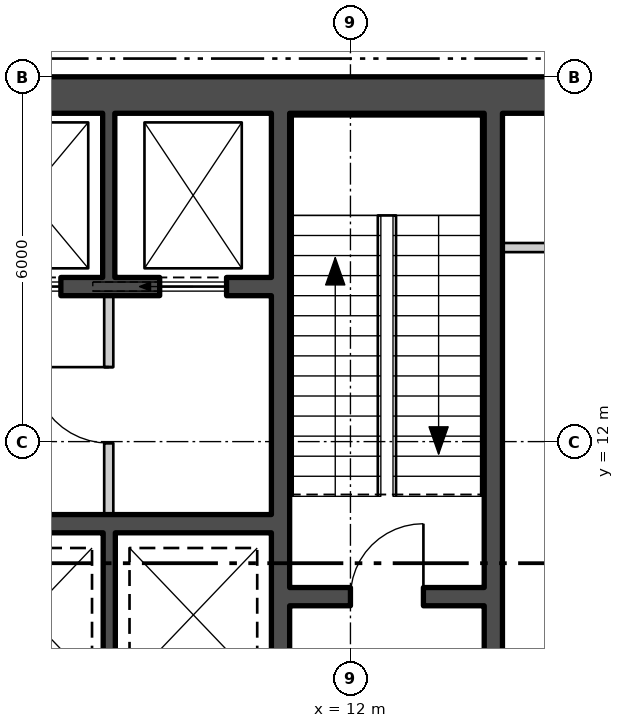
"""IFC4 building model, lengths in metres.
Left out: names, types, materials, properties, quantities, classifications, styles, units other than length and angle.
Written with IfcOpenShell. Run it as: python <this file> out.ifc"""

import sys

from ifc_helpers import new_model, si_unit, direction, frame, frame_2d, origin, place, context, subcontext, project, spatial, polyline, rectangle, outline, extrude, element, fill, save


model = new_model("IFC4")
c1 = context("Model", 3, precision=1e-05, world=origin(), true_north=direction((0.0, 1.0)))
c2 = subcontext(c1, "Body", "Model", "MODEL_VIEW")
j1 = project(units=[si_unit("LENGTHUNIT", "METRE"), si_unit("PLANEANGLEUNIT", "RADIAN")], contexts=[c1])
p1 = place(None, origin())
s1 = spatial("IfcSite", under=j1, at=p1, CompositionType="ELEMENT")
p2 = place(p1, origin())
s2 = spatial("IfcBuilding", under=s1, at=p2, CompositionType="ELEMENT")
p3 = place(p2, frame((0.0, 0.0, 46.8)))
s3 = spatial("IfcBuildingStorey", under=s2, at=p3, CompositionType="ELEMENT", Elevation=46.8)
p4 = place(p3, frame((5.575, -29.294, -0.18), z_axis=(0.0, 0.0, 1.0), x_axis=(0.499999764979, 0.866025539474, 0.0)))
e1 = element("IfcWall", 1, at=p4, inside=s3, PredefinedType="SOLIDWALL", context=c2, shape_type="SweptSolid", body=[
    extrude(outline(polyline([(-0.13, -0.225), (45.87, -0.225), (45.61, 0.225), (0.13, 0.225), (-0.13, -0.225)])), origin(), (0.0, 0.0, 1.0), 4.28),
])
p5 = place(p4, frame((1.424, 0.0, 1.08)))
e2 = element("IfcOpeningElement", 2, at=p5, cuts=e1, PredefinedType="OPENING", context=c2, shape_type="SweptSolid", body=[
    extrude(rectangle(XDim=2.4, YDim=2.6, at=frame_2d((1.2, 1.3))), frame((0.0, 0.235, 0.0), z_axis=(0.0, -1.0, 0.0), x_axis=(1.0, 0.0, 0.0)), (0.0, 0.0, 1.0), 0.47),
])
p6 = place(p4, frame((5.893, 0.0, 1.08)))
e3 = element("IfcOpeningElement", 3, at=p6, cuts=e1, PredefinedType="OPENING", context=c2, shape_type="SweptSolid", body=[
    extrude(rectangle(XDim=2.4, YDim=2.6, at=frame_2d((1.2, 1.3))), frame((0.0, 0.235, 0.0), z_axis=(0.0, -1.0, 0.0), x_axis=(1.0, 0.0, 0.0)), (0.0, 0.0, 1.0), 0.47),
])
p7 = place(p4, frame((10.401, 0.0, 1.08)))
e4 = element("IfcOpeningElement", 4, at=p7, cuts=e1, PredefinedType="OPENING", context=c2, shape_type="SweptSolid", body=[
    extrude(rectangle(XDim=2.4, YDim=2.6, at=frame_2d((1.2, 1.3))), frame((0.0, 0.235, 0.0), z_axis=(0.0, -1.0, 0.0), x_axis=(1.0, 0.0, 0.0)), (0.0, 0.0, 1.0), 0.47),
])
p8 = place(p4, frame((14.909, 0.0, 1.08)))
e5 = element("IfcOpeningElement", 5, at=p8, cuts=e1, PredefinedType="OPENING", context=c2, shape_type="SweptSolid", body=[
    extrude(rectangle(XDim=2.4, YDim=2.6, at=frame_2d((1.2, 1.3))), frame((0.0, 0.235, 0.0), z_axis=(0.0, -1.0, 0.0), x_axis=(1.0, 0.0, 0.0)), (0.0, 0.0, 1.0), 0.47),
])
p9 = place(p4, frame((19.416, 0.0, 1.08)))
e6 = element("IfcOpeningElement", 6, at=p9, cuts=e1, PredefinedType="OPENING", context=c2, shape_type="SweptSolid", body=[
    extrude(rectangle(XDim=2.4, YDim=2.6, at=frame_2d((1.2, 1.3))), frame((0.0, 0.235, 0.0), z_axis=(0.0, -1.0, 0.0), x_axis=(1.0, 0.0, 0.0)), (0.0, 0.0, 1.0), 0.47),
])
p10 = place(p4, frame((23.924, 0.0, 1.08)))
e7 = element("IfcOpeningElement", 7, at=p10, cuts=e1, PredefinedType="OPENING", context=c2, shape_type="SweptSolid", body=[
    extrude(rectangle(XDim=2.4, YDim=2.6, at=frame_2d((1.2, 1.3))), frame((0.0, 0.235, 0.0), z_axis=(0.0, -1.0, 0.0), x_axis=(1.0, 0.0, 0.0)), (0.0, 0.0, 1.0), 0.47),
])
p11 = place(p4, frame((37.447, 0.0, 1.08)))
e8 = element("IfcOpeningElement", 8, at=p11, cuts=e1, PredefinedType="OPENING", context=c2, shape_type="SweptSolid", body=[
    extrude(rectangle(XDim=2.4, YDim=2.6, at=frame_2d((1.2, 1.3))), frame((0.0, 0.235, 0.0), z_axis=(0.0, -1.0, 0.0), x_axis=(1.0, 0.0, 0.0)), (0.0, 0.0, 1.0), 0.47),
])
p12 = place(p4, frame((41.916, 0.0, 1.08)))
e9 = element("IfcOpeningElement", 9, at=p12, cuts=e1, PredefinedType="OPENING", context=c2, shape_type="SweptSolid", body=[
    extrude(rectangle(XDim=2.4, YDim=2.6, at=frame_2d((1.2, 1.3))), frame((0.0, 0.235, 0.0), z_axis=(0.0, -1.0, 0.0), x_axis=(1.0, 0.0, 0.0)), (0.0, 0.0, 1.0), 0.47),
])
p13 = place(p3, frame((-17.5, 17.7, 0.0), z_axis=(0.0, 0.0, 1.0), x_axis=(1.0, 0.0, 0.0)))
e10 = element("IfcWall", 10, at=p13, inside=s3, PredefinedType="SHEAR", context=c2, shape_type="SweptSolid", body=[
    extrude(rectangle(XDim=35.0, YDim=0.6, at=frame_2d((17.5, 0.0))), origin(), (0.0, 0.0, 1.0), 4.3),
])
p14 = place(p3, frame((10.85, 0.6, 0.0), z_axis=(0.0, 0.0, 1.0), x_axis=(0.0, 1.0, 0.0)))
e11 = element("IfcWall", 11, at=p14, inside=s3, PredefinedType="SHEAR", context=c2, shape_type="SweptSolid", body=[
    extrude(rectangle(XDim=16.8, YDim=0.3, at=frame_2d((8.4, 0.0))), origin(), (0.0, 0.0, 1.0), 4.3),
])
p15 = place(p14, frame((5.075, 0.0, 0.0)))
e12 = element("IfcOpeningElement", 12, at=p15, cuts=e11, PredefinedType="OPENING", context=c2, shape_type="SweptSolid", body=[
    extrude(rectangle(XDim=1.25, YDim=2.1, at=frame_2d((0.625, 1.05))), frame((0.0, 0.16, 0.0), z_axis=(0.0, -1.0, 0.0), x_axis=(1.0, 0.0, 0.0)), (0.0, 0.0, 1.0), 0.32),
])
p16 = place(p14, frame((1.525, 0.0, 0.0)))
e13 = element("IfcOpeningElement", 13, at=p16, cuts=e11, PredefinedType="OPENING", context=c2, shape_type="SweptSolid", body=[
    extrude(rectangle(XDim=1.0, YDim=2.1, at=frame_2d((0.5, 1.05))), frame((0.0, 0.16, 0.0), z_axis=(0.0, -1.0, 0.0), x_axis=(1.0, 0.0, 0.0)), (0.0, 0.0, 1.0), 0.32),
])
p17 = place(p3, frame((14.35, 0.6, 0.0), z_axis=(0.0, 0.0, 1.0), x_axis=(0.0, 1.0, 0.0)))
e14 = element("IfcWall", 14, at=p17, inside=s3, PredefinedType="SHEAR", context=c2, shape_type="SweptSolid", body=[
    extrude(rectangle(XDim=16.8, YDim=0.3, at=frame_2d((8.4, 0.0))), origin(), (0.0, 0.0, 1.0), 4.3),
])
p18 = place(p17, frame((5.7, 0.0, 0.0)))
e15 = element("IfcOpeningElement", 15, at=p18, cuts=e14, PredefinedType="OPENING", context=c2, shape_type="SweptSolid", body=[
    extrude(rectangle(XDim=1.5, YDim=2.1, at=frame_2d((0.75, 1.05))), frame((0.0, 0.16, 0.0), z_axis=(0.0, -1.0, 0.0), x_axis=(1.0, 0.0, 0.0)), (0.0, 0.0, 1.0), 0.32),
])
p19 = place(p3, frame((11.0, 9.45, 0.0), z_axis=(0.0, 0.0, 1.0), x_axis=(1.0, 0.0, 0.0)))
e16 = element("IfcWall", 16, at=p19, inside=s3, PredefinedType="SHEAR", context=c2, shape_type="SweptSolid", body=[
    extrude(rectangle(XDim=3.2, YDim=0.3, at=frame_2d((1.6, 0.0))), origin(), (0.0, 0.0, 1.0), 4.3),
])
p20 = place(p19, frame((1.0, 0.0, 0.0)))
e17 = element("IfcOpeningElement", 17, at=p20, cuts=e16, PredefinedType="OPENING", context=c2, shape_type="SweptSolid", body=[
    extrude(rectangle(XDim=1.2, YDim=2.1, at=frame_2d((0.6, 1.05))), frame((0.0, 0.16, 0.0), z_axis=(0.0, -1.0, 0.0), x_axis=(1.0, 0.0, 0.0)), (0.0, 0.0, 1.0), 0.32),
])
p21 = place(p3, frame((-10.7, 14.55, 0.0), z_axis=(0.0, 0.0, 1.0), x_axis=(1.0, 0.0, 0.0)))
e18 = element("IfcWall", 18, at=p21, inside=s3, PredefinedType="SHEAR", context=c2, shape_type="SweptSolid", body=[
    extrude(rectangle(XDim=21.4, YDim=0.3, at=frame_2d((10.7, 0.0))), origin(), (0.0, 0.0, 1.0), 4.3),
])
p22 = place(p21, frame((0.738, 0.0, 0.0)))
e19 = element("IfcOpeningElement", 19, at=p22, cuts=e18, PredefinedType="OPENING", context=c2, shape_type="SweptSolid", body=[
    extrude(rectangle(XDim=1.1, YDim=2.1, at=frame_2d((0.55, 1.05))), frame((0.0, 0.16, 0.0), z_axis=(0.0, -1.0, 0.0), x_axis=(1.0, 0.0, 0.0)), (0.0, 0.0, 1.0), 0.32),
])
p23 = place(p21, frame((3.462, 0.0, 0.0)))
e20 = element("IfcOpeningElement", 20, at=p23, cuts=e18, PredefinedType="OPENING", context=c2, shape_type="SweptSolid", body=[
    extrude(rectangle(XDim=1.1, YDim=2.1, at=frame_2d((0.55, 1.05))), frame((0.0, 0.16, 0.0), z_axis=(0.0, -1.0, 0.0), x_axis=(1.0, 0.0, 0.0)), (0.0, 0.0, 1.0), 0.32),
])
p24 = place(p21, frame((6.138, 0.0, 0.0)))
e21 = element("IfcOpeningElement", 21, at=p24, cuts=e18, PredefinedType="OPENING", context=c2, shape_type="SweptSolid", body=[
    extrude(rectangle(XDim=1.1, YDim=2.1, at=frame_2d((0.55, 1.05))), frame((0.0, 0.16, 0.0), z_axis=(0.0, -1.0, 0.0), x_axis=(1.0, 0.0, 0.0)), (0.0, 0.0, 1.0), 0.32),
])
p25 = place(p21, frame((8.812, 0.0, 0.0)))
e22 = element("IfcOpeningElement", 22, at=p25, cuts=e18, PredefinedType="OPENING", context=c2, shape_type="SweptSolid", body=[
    extrude(rectangle(XDim=1.1, YDim=2.1, at=frame_2d((0.55, 1.05))), frame((0.0, 0.16, 0.0), z_axis=(0.0, -1.0, 0.0), x_axis=(1.0, 0.0, 0.0)), (0.0, 0.0, 1.0), 0.32),
])
p26 = place(p21, frame((14.162, 0.0, 0.0)))
e23 = element("IfcOpeningElement", 23, at=p26, cuts=e18, PredefinedType="OPENING", context=c2, shape_type="SweptSolid", body=[
    extrude(rectangle(XDim=1.1, YDim=2.1, at=frame_2d((0.55, 1.05))), frame((0.0, 0.16, 0.0), z_axis=(0.0, -1.0, 0.0), x_axis=(1.0, 0.0, 0.0)), (0.0, 0.0, 1.0), 0.32),
])
p27 = place(p21, frame((16.837, 0.0, 0.0)))
e24 = element("IfcOpeningElement", 24, at=p27, cuts=e18, PredefinedType="OPENING", context=c2, shape_type="SweptSolid", body=[
    extrude(rectangle(XDim=1.1, YDim=2.1, at=frame_2d((0.55, 1.05))), frame((0.0, 0.16, 0.0), z_axis=(0.0, -1.0, 0.0), x_axis=(1.0, 0.0, 0.0)), (0.0, 0.0, 1.0), 0.32),
])
p28 = place(p21, frame((19.562, 0.0, 0.0)))
e25 = element("IfcOpeningElement", 25, at=p28, cuts=e18, PredefinedType="OPENING", context=c2, shape_type="SweptSolid", body=[
    extrude(rectangle(XDim=1.1, YDim=2.1, at=frame_2d((0.55, 1.05))), frame((0.0, 0.16, 0.0), z_axis=(0.0, -1.0, 0.0), x_axis=(1.0, 0.0, 0.0)), (0.0, 0.0, 1.0), 0.32),
])
p29 = place(p3, frame((2.6, 10.65, 0.0), z_axis=(0.0, 0.0, 1.0), x_axis=(1.0, 0.0, 0.0)))
e26 = element("IfcWall", 26, at=p29, inside=s3, PredefinedType="SHEAR", context=c2, shape_type="SweptSolid", body=[
    extrude(rectangle(XDim=8.1, YDim=0.3, at=frame_2d((4.05, 0.0))), origin(), (0.0, 0.0, 1.0), 4.3),
])
for number, where, z_axis, x_axis in (
    (27, (8.025, 14.7, 0.0), (0.0, 0.0, 1.0), (0.0, 1.0, 0.0)),
    (28, (8.033, 7.8, 0.0), (0.0, 0.0, 1.0), (0.0, 1.0, 0.0)),
):
    element("IfcWall", number, at=place(p3, frame(where, z_axis=z_axis, x_axis=x_axis)), inside=s3, PredefinedType="SHEAR", context=c2, shape_type="SweptSolid", body=[
        extrude(rectangle(XDim=2.7, YDim=0.2, at=frame_2d((1.35, 0.0))), origin(), (0.0, 0.0, 1.0), 4.3),
    ])
p30 = place(p3, frame((8.025, 10.8, 0.0), z_axis=(0.0, 0.0, 1.0), x_axis=(0.0, 1.0, 0.0)))
e29 = element("IfcWall", 29, at=p30, inside=s3, PredefinedType="PARTITIONING", context=c2, shape_type="SweptSolid", body=[
    extrude(rectangle(XDim=3.6, YDim=0.15, at=frame_2d((1.8, 0.0))), origin(), (0.0, 0.0, 1.0), 4.3),
])
p31 = place(p30, frame((1.175, 0.0, 0.0)))
e30 = element("IfcOpeningElement", 30, at=p31, cuts=e29, PredefinedType="OPENING", context=c2, shape_type="SweptSolid", body=[
    extrude(rectangle(XDim=1.25, YDim=2.1, at=frame_2d((0.625, 1.05))), frame((0.0, 0.085, 0.0), z_axis=(0.0, -1.0, 0.0), x_axis=(1.0, 0.0, 0.0)), (0.0, 0.0, 1.0), 0.17),
])
p32 = place(p3, frame((14.5, 15.191, 0.0), z_axis=(0.0, 0.0, 1.0), x_axis=(1.0, 0.0, 0.0)))
e31 = element("IfcWall", 31, at=p32, inside=s3, PredefinedType="PARTITIONING", context=c2, shape_type="SweptSolid", body=[
    extrude(rectangle(XDim=2.4, YDim=0.15, at=frame_2d((1.2, 0.0))), origin(), (0.0, 0.0, 1.0), 4.3),
])
p33 = place(p27, origin())
e32 = element("IfcDoor", 32, at=p33, inside=s3, OperationType="SLIDING_TO_LEFT", PredefinedType="DOOR", context=c2, shape_type="SweptSolid", body=[
    extrude(rectangle(XDim=1.1, YDim=2.1, at=frame_2d((0.55, 1.05))), frame((0.0, 0.025, 0.0), z_axis=(0.0, -1.0, 0.0), x_axis=(1.0, 0.0, 0.0)), (0.0, 0.0, 1.0), 0.05),
])
fill(e24, e32)
p34 = place(p28, origin())
e33 = element("IfcDoor", 33, at=p34, inside=s3, OperationType="SLIDING_TO_LEFT", PredefinedType="DOOR", context=c2, shape_type="SweptSolid", body=[
    extrude(rectangle(XDim=1.1, YDim=2.1, at=frame_2d((0.55, 1.05))), frame((0.0, 0.025, 0.0), z_axis=(0.0, -1.0, 0.0), x_axis=(1.0, 0.0, 0.0)), (0.0, 0.0, 1.0), 0.05),
])
fill(e25, e33)
p35 = place(p31, origin())
e34 = element("IfcDoor", 34, at=p35, inside=s3, OperationType="SINGLE_SWING_LEFT", PredefinedType="DOOR", context=c2, shape_type="SweptSolid", body=[
    extrude(rectangle(XDim=1.25, YDim=2.1, at=frame_2d((0.625, 1.05))), frame((0.0, 0.025, 0.0), z_axis=(0.0, -1.0, 0.0), x_axis=(1.0, 0.0, 0.0)), (0.0, 0.0, 1.0), 0.05),
])
fill(e30, e34)
p36 = place(p20, origin())
e35 = element("IfcDoor", 35, at=p36, inside=s3, OperationType="SINGLE_SWING_LEFT", PredefinedType="DOOR", context=c2, shape_type="SweptSolid", body=[
    extrude(rectangle(XDim=1.2, YDim=2.1, at=frame_2d((0.6, 1.05))), frame((0.0, 0.025, 0.0), z_axis=(0.0, -1.0, 0.0), x_axis=(1.0, 0.0, 0.0)), (0.0, 0.0, 1.0), 0.05),
])
fill(e17, e35)
save(model, sys.argv[1])
